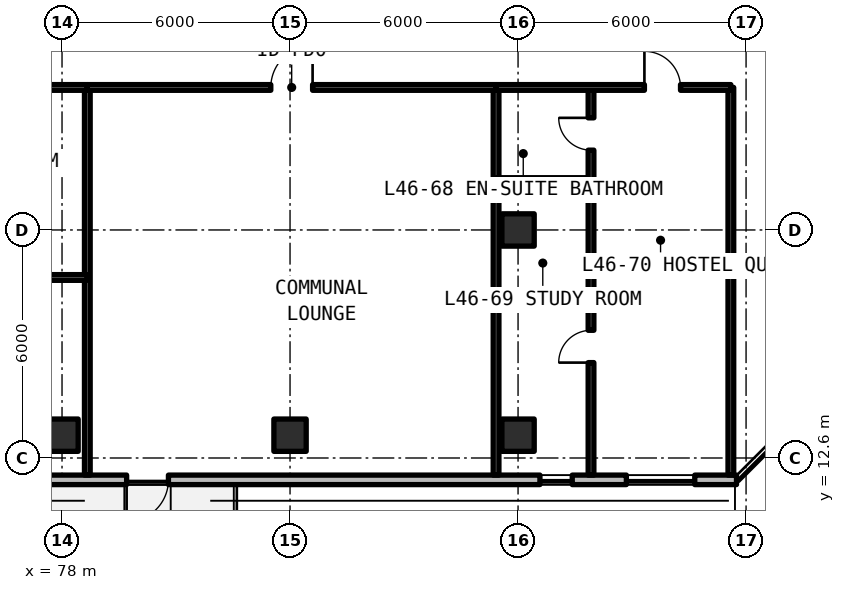
"""IFC4 building model, lengths in metres.
Left out: names, types, materials, properties, quantities, classifications, styles, units other than length and angle.
Written with IfcOpenShell. Run it as: python <this file> out.ifc"""

import sys

from ifc_helpers import new_model, si_unit, direction, frame, frame_2d, origin, origin_2d, place, context, subcontext, project, spatial, rectangle, extrude, element, fill, save


model = new_model("IFC4")
c1 = context("Model", 3, precision=1e-05, world=origin(), true_north=direction((0.0, 1.0)))
c2 = subcontext(c1, "Body", "Model", "MODEL_VIEW")
j1 = project(units=[si_unit("LENGTHUNIT", "METRE"), si_unit("PLANEANGLEUNIT", "RADIAN")], contexts=[c1])
p1 = place(None, origin())
s1 = spatial("IfcSite", under=j1, at=p1, CompositionType="ELEMENT")
p2 = place(p1, origin())
s2 = spatial("IfcBuilding", under=s1, at=p2, CompositionType="ELEMENT")
p3 = place(p2, frame((0.0, 0.0, 165.66)))
s3 = spatial("IfcBuildingStorey", under=s2, at=p3, CompositionType="ELEMENT", Elevation=165.66)
for number, where, z_axis, x_axis in (
    (1, (90.0, 18.6, 0.0), (0.0, 0.0, 1.0), (1.0, 0.0, 0.0)),
    (2, (78.0, 13.2, 0.0), (0.0, 0.0, 1.0), (1.0, 0.0, 0.0)),
    (3, (84.0, 13.2, 0.0), (0.0, 0.0, 1.0), (1.0, 0.0, 0.0)),
    (4, (90.0, 13.2, 0.0), (0.0, 0.0, 1.0), (1.0, 0.0, 0.0)),
):
    element("IfcColumn", number, at=place(p3, frame(where, z_axis=z_axis, x_axis=x_axis)), inside=s3, PredefinedType="COLUMN", context=c2, shape_type="SweptSolid", body=[
        extrude(rectangle(XDim=0.85, YDim=0.85, at=origin_2d()), origin(), (0.0, 0.0, 1.0), 3.63),
    ])
p4 = place(p3, frame((52.125, 12.025, 0.0), z_axis=(0.0, 0.0, 1.0), x_axis=(1.0, 0.0, 0.0)))
e5 = element("IfcWall", 5, at=p4, inside=s3, PredefinedType="SOLIDWALL", context=c2, shape_type="SweptSolid", body=[
    extrude(rectangle(XDim=43.623, YDim=0.25, at=frame_2d((21.812, 0.0))), origin(), (0.0, 0.0, 1.0), 3.41),
])
p5 = place(p4, frame((16.725, 0.0, 0.0)))
e6 = element("IfcOpeningElement", 6, at=p5, cuts=e5, PredefinedType="OPENING", context=c2, shape_type="SweptSolid", body=[
    extrude(rectangle(XDim=1.1, YDim=2.15, at=frame_2d((0.55, 1.075))), frame((0.0, 0.135, 0.0), z_axis=(0.0, -1.0, 0.0), x_axis=(1.0, 0.0, 0.0)), (0.0, 0.0, 1.0), 0.27),
])
p6 = place(p4, frame((27.575, 0.0, 0.0)))
e7 = element("IfcOpeningElement", 7, at=p6, cuts=e5, PredefinedType="OPENING", context=c2, shape_type="SweptSolid", body=[
    extrude(rectangle(XDim=1.1, YDim=2.15, at=frame_2d((0.55, 1.075))), frame((0.0, 0.135, 0.0), z_axis=(0.0, -1.0, 0.0), x_axis=(1.0, 0.0, 0.0)), (0.0, 0.0, 1.0), 0.27),
])
p7 = place(p4, frame((2.756, 0.0, 0.78)))
e8 = element("IfcOpeningElement", 8, at=p7, cuts=e5, PredefinedType="OPENING", context=c2, shape_type="SweptSolid", body=[
    extrude(rectangle(XDim=1.8, YDim=1.66, at=frame_2d((0.9, 0.83))), frame((0.0, 0.135, 0.0), z_axis=(0.0, -1.0, 0.0), x_axis=(1.0, 0.0, 0.0)), (0.0, 0.0, 1.0), 0.27),
])
p8 = place(p4, frame((8.776, 0.0, 0.78)))
e9 = element("IfcOpeningElement", 9, at=p8, cuts=e5, PredefinedType="OPENING", context=c2, shape_type="SweptSolid", body=[
    extrude(rectangle(XDim=1.8, YDim=1.66, at=frame_2d((0.9, 0.83))), frame((0.0, 0.135, 0.0), z_axis=(0.0, -1.0, 0.0), x_axis=(1.0, 0.0, 0.0)), (0.0, 0.0, 1.0), 0.27),
])
p9 = place(p4, frame((14.654, 0.0, 0.78)))
e10 = element("IfcOpeningElement", 10, at=p9, cuts=e5, PredefinedType="OPENING", context=c2, shape_type="SweptSolid", body=[
    extrude(rectangle(XDim=0.85, YDim=1.65, at=frame_2d((0.425, 0.825))), frame((0.0, 0.135, 0.0), z_axis=(0.0, -1.0, 0.0), x_axis=(1.0, 0.0, 0.0)), (0.0, 0.0, 1.0), 0.27),
])
p10 = place(p4, frame((23.159, 0.0, 0.78)))
e11 = element("IfcOpeningElement", 11, at=p10, cuts=e5, PredefinedType="OPENING", context=c2, shape_type="SweptSolid", body=[
    extrude(rectangle(XDim=1.8, YDim=1.66, at=frame_2d((0.9, 0.83))), frame((0.0, 0.135, 0.0), z_axis=(0.0, -1.0, 0.0), x_axis=(1.0, 0.0, 0.0)), (0.0, 0.0, 1.0), 0.27),
])
p11 = place(p4, frame((38.451, 0.0, 0.78)))
e12 = element("IfcOpeningElement", 12, at=p11, cuts=e5, PredefinedType="OPENING", context=c2, shape_type="SweptSolid", body=[
    extrude(rectangle(XDim=0.85, YDim=1.65, at=frame_2d((0.425, 0.825))), frame((0.0, 0.135, 0.0), z_axis=(0.0, -1.0, 0.0), x_axis=(1.0, 0.0, 0.0)), (0.0, 0.0, 1.0), 0.27),
])
p12 = place(p4, frame((40.725, 0.0, 0.78)))
e13 = element("IfcOpeningElement", 13, at=p12, cuts=e5, PredefinedType="OPENING", context=c2, shape_type="SweptSolid", body=[
    extrude(rectangle(XDim=1.8, YDim=1.66, at=frame_2d((0.9, 0.83))), frame((0.0, 0.135, 0.0), z_axis=(0.0, -1.0, 0.0), x_axis=(1.0, 0.0, 0.0)), (0.0, 0.0, 1.0), 0.27),
])
for number, where, z_axis, x_axis in (
    (14, (95.6, 12.15, 0.0), (0.0, 0.0, 1.0), (0.0, 1.0, 0.0)),
    (15, (78.666, 12.15, 0.0), (0.0, 0.0, 1.0), (0.0, 1.0, 0.0)),
):
    element("IfcWall", number, at=place(p3, frame(where, z_axis=z_axis, x_axis=x_axis)), inside=s3, PredefinedType="SOLIDWALL", context=c2, shape_type="SweptSolid", body=[
        extrude(rectangle(XDim=10.2, YDim=0.15, at=frame_2d((5.1, 0.0))), origin(), (0.0, 0.0, 1.0), 2.63),
    ])
p13 = place(p3, frame((68.368, 17.35, 0.0), z_axis=(0.0, 0.0, 1.0), x_axis=(1.0, 0.0, 0.0)))
e16 = element("IfcWall", 16, at=p13, inside=s3, PredefinedType="PARTITIONING", context=c2, shape_type="SweptSolid", body=[
    extrude(rectangle(XDim=10.298, YDim=0.15, at=frame_2d((5.149, 0.0))), origin(), (0.0, 0.0, 1.0), 2.63),
])
p14 = place(p13, frame((3.109, 0.0, 0.0)))
e17 = element("IfcOpeningElement", 17, at=p14, cuts=e16, PredefinedType="OPENING", context=c2, shape_type="SweptSolid", body=[
    extrude(rectangle(XDim=0.85, YDim=2.1, at=frame_2d((0.425, 1.05))), frame((0.0, 0.085, 0.0), z_axis=(0.0, -1.0, 0.0), x_axis=(1.0, 0.0, 0.0)), (0.0, 0.0, 1.0), 0.17),
])
p15 = place(p13, frame((7.401, 0.0, 0.0)))
e18 = element("IfcOpeningElement", 18, at=p15, cuts=e16, PredefinedType="OPENING", context=c2, shape_type="SweptSolid", body=[
    extrude(rectangle(XDim=0.85, YDim=2.1, at=frame_2d((0.425, 1.05))), frame((0.0, 0.085, 0.0), z_axis=(0.0, -1.0, 0.0), x_axis=(1.0, 0.0, 0.0)), (0.0, 0.0, 1.0), 0.17),
])
p16 = place(p3, frame((68.368, 22.35, 0.0), z_axis=(0.0, 0.0, 1.0), x_axis=(1.0, 0.0, 0.0)))
e19 = element("IfcWall", 19, at=p16, inside=s3, PredefinedType="SOLIDWALL", context=c2, shape_type="SweptSolid", body=[
    extrude(rectangle(XDim=10.298, YDim=0.15, at=frame_2d((5.149, 0.0))), origin(), (0.0, 0.0, 1.0), 2.63),
])
p17 = place(p16, frame((5.57, 0.0, 0.0)))
e20 = element("IfcOpeningElement", 20, at=p17, cuts=e19, PredefinedType="OPENING", context=c2, shape_type="SweptSolid", body=[
    extrude(rectangle(XDim=0.95, YDim=2.15, at=frame_2d((0.475, 1.075))), frame((0.0, 0.085, 0.0), z_axis=(0.0, -1.0, 0.0), x_axis=(1.0, 0.0, 0.0)), (0.0, 0.0, 1.0), 0.17),
])
p18 = place(p3, frame((89.421, 12.15, 0.0), z_axis=(0.0, 0.0, 1.0), x_axis=(0.0, 1.0, 0.0)))
e21 = element("IfcWall", 21, at=p18, inside=s3, PredefinedType="SOLIDWALL", context=c2, shape_type="SweptSolid", body=[
    extrude(rectangle(XDim=10.2, YDim=0.15, at=frame_2d((5.1, 0.0))), origin(), (0.0, 0.0, 1.0), 2.63),
])
p19 = place(p3, frame((78.666, 22.35, 0.0), z_axis=(0.0, 0.0, 1.0), x_axis=(1.0, 0.0, 0.0)))
e22 = element("IfcWall", 22, at=p19, inside=s3, PredefinedType="SOLIDWALL", context=c2, shape_type="SweptSolid", body=[
    extrude(rectangle(XDim=10.756, YDim=0.15, at=frame_2d((5.378, 0.0))), origin(), (0.0, 0.0, 1.0), 2.63),
])
p20 = place(p19, frame((4.828, 0.0, 0.0)))
e23 = element("IfcOpeningElement", 23, at=p20, cuts=e22, PredefinedType="OPENING", context=c2, shape_type="SweptSolid", body=[
    extrude(rectangle(XDim=1.1, YDim=2.15, at=frame_2d((0.55, 1.075))), frame((0.0, 0.085, 0.0), z_axis=(0.0, -1.0, 0.0), x_axis=(1.0, 0.0, 0.0)), (0.0, 0.0, 1.0), 0.17),
])
p21 = place(p3, frame((89.421, 19.9, 0.0), z_axis=(0.0, 0.0, 1.0), x_axis=(1.0, 0.0, 0.0)))
e24 = element("IfcWall", 24, at=p21, inside=s3, PredefinedType="PARTITIONING", context=c2, shape_type="SweptSolid", body=[
    extrude(rectangle(XDim=2.499, YDim=0.15, at=frame_2d((1.249, 0.0))), origin(), (0.0, 0.0, 1.0), 2.63),
])
p22 = place(p3, frame((91.92, 12.15, 0.0), z_axis=(0.0, 0.0, 1.0), x_axis=(0.0, 1.0, 0.0)))
e25 = element("IfcWall", 25, at=p22, inside=s3, PredefinedType="PARTITIONING", context=c2, shape_type="SweptSolid", body=[
    extrude(rectangle(XDim=10.2, YDim=0.15, at=frame_2d((5.1, 0.0))), origin(), (0.0, 0.0, 1.0), 2.63),
])
p23 = place(p22, frame((2.96, 0.0, 0.0)))
e26 = element("IfcOpeningElement", 26, at=p23, cuts=e25, PredefinedType="OPENING", context=c2, shape_type="SweptSolid", body=[
    extrude(rectangle(XDim=0.85, YDim=2.1, at=frame_2d((0.425, 1.05))), frame((0.0, 0.085, 0.0), z_axis=(0.0, -1.0, 0.0), x_axis=(1.0, 0.0, 0.0)), (0.0, 0.0, 1.0), 0.17),
])
p24 = place(p22, frame((8.55, 0.0, 0.0)))
e27 = element("IfcOpeningElement", 27, at=p24, cuts=e25, PredefinedType="OPENING", context=c2, shape_type="SweptSolid", body=[
    extrude(rectangle(XDim=0.85, YDim=2.1, at=frame_2d((0.425, 1.05))), frame((0.0, 0.085, 0.0), z_axis=(0.0, -1.0, 0.0), x_axis=(1.0, 0.0, 0.0)), (0.0, 0.0, 1.0), 0.17),
])
p25 = place(p3, frame((89.421, 22.35, 0.0), z_axis=(0.0, 0.0, 1.0), x_axis=(1.0, 0.0, 0.0)))
e28 = element("IfcWall", 28, at=p25, inside=s3, PredefinedType="SOLIDWALL", context=c2, shape_type="SweptSolid", body=[
    extrude(rectangle(XDim=6.179, YDim=0.15, at=frame_2d((3.089, 0.0))), origin(), (0.0, 0.0, 1.0), 2.63),
])
p26 = place(p25, frame((3.904, 0.0, 0.0)))
e29 = element("IfcOpeningElement", 29, at=p26, cuts=e28, PredefinedType="OPENING", context=c2, shape_type="SweptSolid", body=[
    extrude(rectangle(XDim=0.95, YDim=2.15, at=frame_2d((0.475, 1.075))), frame((0.0, 0.085, 0.0), z_axis=(0.0, -1.0, 0.0), x_axis=(1.0, 0.0, 0.0)), (0.0, 0.0, 1.0), 0.17),
])
p27 = place(p6, frame((1.1, 0.0, 0.0), z_axis=(0.0, 0.0, 1.0), x_axis=(-1.0, 0.0, 0.0)))
e30 = element("IfcDoor", 30, at=p27, inside=s3, OperationType="SINGLE_SWING_RIGHT", PredefinedType="DOOR", context=c2, shape_type="SweptSolid", body=[
    extrude(rectangle(XDim=1.1, YDim=2.15, at=frame_2d((0.55, 1.075))), frame((0.0, 0.025, 0.0), z_axis=(0.0, -1.0, 0.0), x_axis=(1.0, 0.0, 0.0)), (0.0, 0.0, 1.0), 0.05),
])
fill(e7, e30)
p28 = place(p11, origin())
e31 = element("IfcWindow", 31, at=p28, inside=s3, PartitioningType="SINGLE_PANEL", PredefinedType="WINDOW", context=c2, shape_type="SweptSolid", body=[
    extrude(rectangle(XDim=0.85, YDim=1.65, at=frame_2d((0.425, 0.825))), frame((0.0, 0.03, 0.0), z_axis=(0.0, -1.0, 0.0), x_axis=(1.0, 0.0, 0.0)), (0.0, 0.0, 1.0), 0.06),
])
fill(e12, e31)
p29 = place(p12, origin())
e32 = element("IfcWindow", 32, at=p29, inside=s3, PartitioningType="SINGLE_PANEL", PredefinedType="WINDOW", context=c2, shape_type="SweptSolid", body=[
    extrude(rectangle(XDim=1.8, YDim=1.66, at=frame_2d((0.9, 0.83))), frame((0.0, 0.03, 0.0), z_axis=(0.0, -1.0, 0.0), x_axis=(1.0, 0.0, 0.0)), (0.0, 0.0, 1.0), 0.06),
])
fill(e13, e32)
p30 = place(p20, origin())
e33 = element("IfcDoor", 33, at=p30, inside=s3, OperationType="SINGLE_SWING_RIGHT", PredefinedType="DOOR", context=c2, shape_type="SweptSolid", body=[
    extrude(rectangle(XDim=1.1, YDim=2.15, at=frame_2d((0.55, 1.075))), frame((0.0, 0.025, 0.0), z_axis=(0.0, -1.0, 0.0), x_axis=(1.0, 0.0, 0.0)), (0.0, 0.0, 1.0), 0.05),
])
fill(e23, e33)
p31 = place(p23, origin())
e34 = element("IfcDoor", 34, at=p31, inside=s3, OperationType="SINGLE_SWING_LEFT", PredefinedType="DOOR", context=c2, shape_type="SweptSolid", body=[
    extrude(rectangle(XDim=0.85, YDim=2.1, at=frame_2d((0.425, 1.05))), frame((0.0, 0.025, 0.0), z_axis=(0.0, -1.0, 0.0), x_axis=(1.0, 0.0, 0.0)), (0.0, 0.0, 1.0), 0.05),
])
fill(e26, e34)
p32 = place(p24, origin())
e35 = element("IfcDoor", 35, at=p32, inside=s3, OperationType="SINGLE_SWING_RIGHT", PredefinedType="DOOR", context=c2, shape_type="SweptSolid", body=[
    extrude(rectangle(XDim=0.85, YDim=2.1, at=frame_2d((0.425, 1.05))), frame((0.0, 0.025, 0.0), z_axis=(0.0, -1.0, 0.0), x_axis=(1.0, 0.0, 0.0)), (0.0, 0.0, 1.0), 0.05),
])
fill(e27, e35)
p33 = place(p26, origin())
e36 = element("IfcDoor", 36, at=p33, inside=s3, OperationType="SINGLE_SWING_LEFT", PredefinedType="DOOR", context=c2, shape_type="SweptSolid", body=[
    extrude(rectangle(XDim=0.95, YDim=2.15, at=frame_2d((0.475, 1.075))), frame((0.0, 0.025, 0.0), z_axis=(0.0, -1.0, 0.0), x_axis=(1.0, 0.0, 0.0)), (0.0, 0.0, 1.0), 0.05),
])
fill(e29, e36)
save(model, sys.argv[1])
